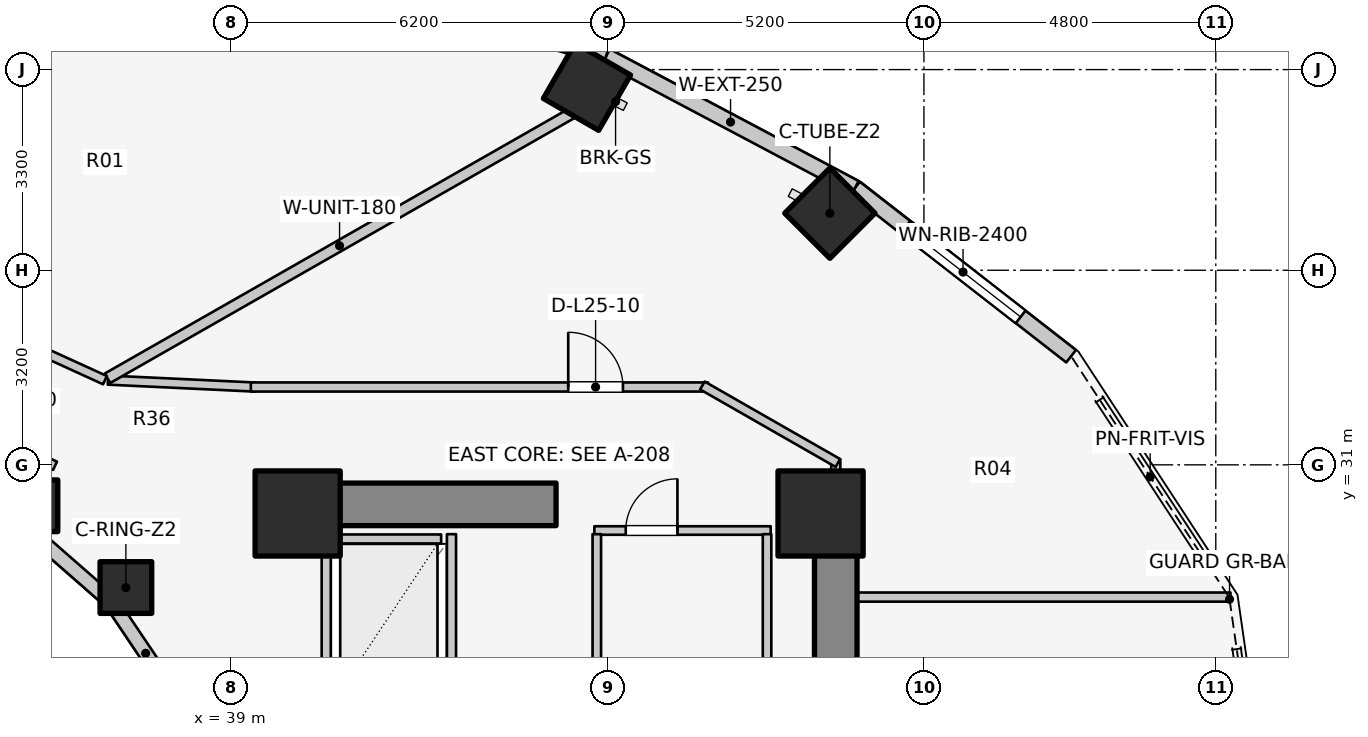
"""IFC4 building model, lengths in metres.
Left out: names, types, materials, properties, quantities, classifications, styles, units other than length and angle.
Written with IfcOpenShell. Run it as: python <this file> out.ifc"""

import sys

from ifc_helpers import new_model, si_unit, direction, frame, frame_2d, origin, origin_2d, place, context, subcontext, project, spatial, rectangle, extrude, element, fill, save


model = new_model("IFC4")
c1 = context("Model", 3, precision=1e-05, world=origin(), true_north=direction((0.0, 1.0)))
c2 = subcontext(c1, "Body", "Model", "MODEL_VIEW")
j1 = project(units=[si_unit("LENGTHUNIT", "METRE"), si_unit("PLANEANGLEUNIT", "RADIAN")], contexts=[c1])
p1 = place(None, origin())
s1 = spatial("IfcSite", under=j1, at=p1, CompositionType="ELEMENT")
p2 = place(p1, origin())
s2 = spatial("IfcBuilding", under=s1, at=p2, CompositionType="ELEMENT")
p3 = place(p2, frame((0.0, 0.0, 85.6)))
s3 = spatial("IfcBuildingStorey", under=s2, at=p3, CompositionType="ELEMENT", Elevation=85.6)
p4 = place(p3, frame((48.95, 17.05, 0.0), z_axis=(0.0, 0.0, 1.0), x_axis=(0.0, 1.0, 0.0)))
e1 = element("IfcWall", 1, at=p4, inside=s3, PredefinedType="SHEAR", context=c2, shape_type="SweptSolid", body=[
    extrude(rectangle(XDim=12.8, YDim=0.7, at=frame_2d((6.4, 0.0))), origin(), (0.0, 0.0, 1.0), 3.1),
])
p5 = place(p3, frame((39.85, 30.35, 0.0), z_axis=(0.0, 0.0, 1.0), x_axis=(1.0, 0.0, 0.0)))
e2 = element("IfcWall", 2, at=p5, inside=s3, PredefinedType="SHEAR", context=c2, shape_type="SweptSolid", body=[
    extrude(rectangle(XDim=4.5, YDim=0.7, at=frame_2d((2.25, 0.0))), origin(), (0.0, 0.0, 1.0), 3.1),
])
for number, where, z_axis, x_axis in (
    (3, (48.7, 30.2, 0.0), (0.0, 0.0, 1.0), (1.0, 0.0, 0.0)),
    (4, (40.1, 30.2, 0.0), (0.0, 0.0, 1.0), (1.0, 0.0, 0.0)),
):
    element("IfcColumn", number, at=place(p3, frame(where, z_axis=z_axis, x_axis=x_axis)), inside=s3, PredefinedType="COLUMN", context=c2, shape_type="SweptSolid", body=[
        extrude(rectangle(XDim=1.4, YDim=1.4, at=origin_2d()), origin(), (0.0, 0.0, 1.0), 3.1),
    ])
p6 = place(p3, frame((37.275, 28.982, 0.0), z_axis=(0.0, 0.0, 1.0), x_axis=(1.0, 0.0, 0.0)))
e5 = element("IfcColumn", 5, at=p6, inside=s3, PredefinedType="COLUMN", context=c2, shape_type="SweptSolid", body=[
    extrude(rectangle(XDim=0.85, YDim=0.85, at=origin_2d()), origin(), (0.0, 0.0, 1.0), 3.1),
])
p7 = place(p3, frame((48.853, 35.138, 0.0), z_axis=(0.0, 0.0, 1.0), x_axis=(0.707106781187, 0.707106781187, 0.0)))
e6 = element("IfcColumn", 6, at=p7, inside=s3, PredefinedType="COLUMN", context=c2, shape_type="SweptSolid", body=[
    extrude(rectangle(XDim=1.05, YDim=1.05, at=origin_2d()), origin(), (0.0, 0.0, 1.0), 3.1),
])
p8 = place(p3, frame((35.73, 30.327, 0.0), z_axis=(0.0, 0.0, 1.0), x_axis=(1.0, 0.0, 0.0)))
e7 = element("IfcColumn", 7, at=p8, inside=s3, PredefinedType="COLUMN", context=c2, shape_type="SweptSolid", body=[
    extrude(rectangle(XDim=0.85, YDim=0.85, at=origin_2d()), origin(), (0.0, 0.0, 1.0), 3.1),
])
p9 = place(p3, frame((44.858, 37.218, 0.0), z_axis=(0.0, 0.0, 1.0), x_axis=(0.5, 0.866025403784, 0.0)))
e8 = element("IfcColumn", 8, at=p9, inside=s3, PredefinedType="COLUMN", context=c2, shape_type="SweptSolid", body=[
    extrude(rectangle(XDim=1.05, YDim=1.05, at=origin_2d()), origin(), (0.0, 0.0, 1.0), 3.1),
])
p10 = place(p3, frame((38.166, 27.06, 0.0), z_axis=(0.0, 0.0, 1.0), x_axis=(-0.558197800898, 0.829707909492, 0.0)))
e9 = element("IfcWall", 9, at=p10, inside=s3, PredefinedType="STANDARD", context=c2, shape_type="SweptSolid", body=[
    extrude(rectangle(XDim=2.027, YDim=0.23, at=frame_2d((1.013, 0.0))), origin(), (0.0, 0.0, 1.0), 2.16),
])
p11 = place(p3, frame((37.035, 28.742, 0.0), z_axis=(0.0, 0.0, 1.0), x_axis=(-0.752576694707, 0.658504607869, 0.0)))
e10 = element("IfcWall", 10, at=p11, inside=s3, PredefinedType="STANDARD", context=c2, shape_type="SweptSolid", body=[
    extrude(rectangle(XDim=1.959, YDim=0.23, at=frame_2d((0.98, 0.0))), origin(), (0.0, 0.0, 1.0), 2.16),
])
p12 = place(p3, frame((52.821, 32.786, 0.0), z_axis=(0.0, 0.0, 1.0), x_axis=(-0.789127449954, 0.614229491094, 0.0)))
e11 = element("IfcWall", 11, at=p12, inside=s3, PredefinedType="STANDARD", context=c2, shape_type="SweptSolid", body=[
    extrude(rectangle(XDim=4.505, YDim=0.26, at=frame_2d((2.252, 0.0))), origin(), (0.0, 0.0, 1.0), 2.85),
])
p13 = place(p12, frame((1.052, 0.0, 0.75)))
e12 = element("IfcOpeningElement", 12, at=p13, cuts=e11, PredefinedType="OPENING", context=c2, shape_type="SweptSolid", body=[
    extrude(rectangle(XDim=2.4, YDim=1.7, at=frame_2d((1.2, 0.85))), frame((0.0, 0.14, 0.0), z_axis=(0.0, -1.0, 0.0), x_axis=(1.0, 0.0, 0.0)), (0.0, 0.0, 1.0), 0.28),
])
p14 = place(p3, frame((49.266, 35.553, 0.0), z_axis=(0.0, 0.0, 1.0), x_axis=(-0.883668636807, 0.4681129568, 0.0)))
e13 = element("IfcWall", 13, at=p14, inside=s3, PredefinedType="STANDARD", context=c2, shape_type="SweptSolid", body=[
    extrude(rectangle(XDim=4.631, YDim=0.26, at=frame_2d((2.316, 0.0))), origin(), (0.0, 0.0, 1.0), 2.85),
])
p15 = place(p3, frame((45.173, 37.721, 0.0), z_axis=(0.0, 0.0, 1.0), x_axis=(-0.962938491413, 0.269721081407, 0.0)))
e14 = element("IfcWall", 14, at=p15, inside=s3, PredefinedType="STANDARD", context=c2, shape_type="SweptSolid", body=[
    extrude(rectangle(XDim=5.563, YDim=0.26, at=frame_2d((2.782, 0.0))), origin(), (0.0, 0.0, 1.0), 2.85),
])
p16 = place(p15, frame((2.031, 0.0, 0.75)))
e15 = element("IfcOpeningElement", 15, at=p16, cuts=e14, PredefinedType="OPENING", context=c2, shape_type="SweptSolid", body=[
    extrude(rectangle(XDim=1.5, YDim=1.6, at=frame_2d((0.75, 0.8))), frame((0.0, 0.14, 0.0), z_axis=(0.0, -1.0, 0.0), x_axis=(1.0, 0.0, 0.0)), (0.0, 0.0, 1.0), 0.28),
])
p17 = place(p3, frame((40.74, 29.78, 0.0), z_axis=(0.0, 0.0, 1.0), x_axis=(1.0, 0.0, 0.0)))
e16 = element("IfcWall", 16, at=p17, inside=s3, PredefinedType="SOLIDWALL", context=c2, shape_type="SweptSolid", body=[
    extrude(rectangle(XDim=1.72, YDim=0.15, at=frame_2d((0.86, 0.0))), origin(), (0.0, 0.0, 1.0), 2.855),
])
for number, where, z_axis, x_axis in (
    (17, (40.57, 27.14, 0.0), (0.0, 0.0, 1.0), (0.0, 1.0, 0.0)),
    (18, (42.63, 27.14, 0.0), (0.0, 0.0, 1.0), (0.0, 1.0, 0.0)),
):
    element("IfcWall", number, at=place(p3, frame(where, z_axis=z_axis, x_axis=x_axis)), inside=s3, PredefinedType="SOLIDWALL", context=c2, shape_type="SweptSolid", body=[
        extrude(rectangle(XDim=2.72, YDim=0.15, at=frame_2d((1.36, 0.0))), origin(), (0.0, 0.0, 1.0), 2.855),
    ])
p18 = place(p3, frame((44.98, 29.92, 0.0), z_axis=(0.0, 0.0, 1.0), x_axis=(1.0, 0.0, 0.0)))
e19 = element("IfcWall", 19, at=p18, inside=s3, PredefinedType="PLUMBINGWALL", context=c2, shape_type="SweptSolid", body=[
    extrude(rectangle(XDim=2.9, YDim=0.14, at=frame_2d((1.45, 0.0))), origin(), (0.0, 0.0, 1.0), 2.855),
])
p19 = place(p18, frame((0.516, 0.0, 0.0)))
e20 = element("IfcOpeningElement", 20, at=p19, cuts=e19, PredefinedType="OPENING", context=c2, shape_type="SweptSolid", body=[
    extrude(rectangle(XDim=0.85, YDim=2.05, at=frame_2d((0.425, 1.025))), frame((0.0, 0.08, 0.0), z_axis=(0.0, -1.0, 0.0), x_axis=(1.0, 0.0, 0.0)), (0.0, 0.0, 1.0), 0.16),
])
for number, where, z_axis, x_axis in (
    (21, (45.02, 25.98, 0.0), (0.0, 0.0, 1.0), (0.0, 1.0, 0.0)),
    (22, (47.82, 25.98, 0.0), (0.0, 0.0, 1.0), (0.0, 1.0, 0.0)),
):
    element("IfcWall", number, at=place(p3, frame(where, z_axis=z_axis, x_axis=x_axis)), inside=s3, PredefinedType="PLUMBINGWALL", context=c2, shape_type="SweptSolid", body=[
        extrude(rectangle(XDim=3.88, YDim=0.14, at=frame_2d((1.94, 0.0))), origin(), (0.0, 0.0, 1.0), 2.855),
    ])
p20 = place(p3, frame((36.11, 30.985, 0.0), z_axis=(0.0, 0.0, 1.0), x_axis=(-0.906943449489, 0.421252393975, 0.0)))
e23 = element("IfcWall", 23, at=p20, inside=s3, PredefinedType="PARTITIONING", context=c2, shape_type="SweptSolid", body=[
    extrude(rectangle(XDim=2.186, YDim=0.15, at=frame_2d((1.093, 0.0))), origin(), (0.0, 0.0, 1.0), 2.272),
])
p21 = place(p3, frame((48.95, 28.825, 0.0), z_axis=(0.0, 0.0, 1.0), x_axis=(1.0, 0.0, 0.0)))
e24 = element("IfcWall", 24, at=p21, inside=s3, PredefinedType="PARTITIONING", context=c2, shape_type="SweptSolid", body=[
    extrude(rectangle(XDim=6.492, YDim=0.15, at=frame_2d((3.246, 0.0))), origin(), (0.0, 0.0, 1.0), 2.855),
])
p22 = place(p3, frame((48.95, 29.8, 0.0), z_axis=(0.0, 0.0, 1.0), x_axis=(0.0, 1.0, 0.0)))
e25 = element("IfcWall", 25, at=p22, inside=s3, PredefinedType="PARTITIONING", context=c2, shape_type="SweptSolid", body=[
    extrude(rectangle(XDim=1.29, YDim=0.15, at=frame_2d((0.645, 0.0))), origin(), (0.0, 0.0, 1.0), 2.142),
])
p23 = place(p3, frame((36.98, 32.394, 0.0), z_axis=(0.0, 0.0, 1.0), x_axis=(0.998877427952, -0.047369651964, 0.0)))
e26 = element("IfcWall", 26, at=p23, inside=s3, PredefinedType="PARTITIONING", context=c2, shape_type="SweptSolid", body=[
    extrude(rectangle(XDim=2.433, YDim=0.15, at=frame_2d((1.216, 0.0))), origin(), (0.0, 0.0, 1.0), 2.272),
])
p24 = place(p3, frame((39.33, 32.28, 0.0), z_axis=(0.0, 0.0, 1.0), x_axis=(1.0, 0.0, 0.0)))
e27 = element("IfcWall", 27, at=p24, inside=s3, PredefinedType="PARTITIONING", context=c2, shape_type="SweptSolid", body=[
    extrude(rectangle(XDim=7.52, YDim=0.15, at=frame_2d((3.76, 0.0))), origin(), (0.0, 0.0, 1.0), 2.272),
])
p25 = place(p24, frame((5.22, 0.0, 0.0)))
e28 = element("IfcOpeningElement", 28, at=p25, cuts=e27, PredefinedType="OPENING", context=c2, shape_type="SweptSolid", body=[
    extrude(rectangle(XDim=0.9, YDim=2.1, at=frame_2d((0.45, 1.05))), frame((0.0, 0.085, 0.0), z_axis=(0.0, -1.0, 0.0), x_axis=(1.0, 0.0, 0.0)), (0.0, 0.0, 1.0), 0.17),
])
p26 = place(p3, frame((46.757, 32.305, 0.0), z_axis=(0.0, 0.0, 1.0), x_axis=(0.867991349648, -0.496579315857, 0.0)))
e29 = element("IfcWall", 29, at=p26, inside=s3, PredefinedType="PARTITIONING", context=c2, shape_type="SweptSolid", body=[
    extrude(rectangle(XDim=2.567, YDim=0.15, at=frame_2d((1.283, 0.0))), origin(), (0.0, 0.0, 1.0), 2.142),
])
p27 = place(p3, frame((36.973, 32.424, 0.0), z_axis=(0.0, 0.0, 1.0), x_axis=(0.868484076301, 0.495717065685, 0.0)))
e30 = element("IfcWall", 30, at=p27, inside=s3, PredefinedType="PARTITIONING", context=c2, shape_type="SweptSolid", body=[
    extrude(rectangle(XDim=8.789, YDim=0.18, at=frame_2d((4.394, 0.0))), origin(), (0.0, 0.0, 1.0), 2.272),
])
p28 = place(p3, frame((36.931, 32.393, 0.0), z_axis=(0.0, 0.0, 1.0), x_axis=(-0.909747571199, 0.415161843982, 0.0)))
e31 = element("IfcWall", 31, at=p28, inside=s3, PredefinedType="PARTITIONING", context=c2, shape_type="SweptSolid", body=[
    extrude(rectangle(XDim=2.625, YDim=0.15, at=frame_2d((1.312, 0.0))), origin(), (0.0, 0.0, 1.0), 2.272),
])
p29 = place(p13, origin())
e32 = element("IfcWindow", 32, at=p29, inside=s3, PartitioningType="SINGLE_PANEL", PredefinedType="WINDOW", context=c2, shape_type="SweptSolid", body=[
    extrude(rectangle(XDim=2.4, YDim=1.7, at=frame_2d((1.2, 0.85))), frame((0.0, 0.03, 0.0), z_axis=(0.0, -1.0, 0.0), x_axis=(1.0, 0.0, 0.0)), (0.0, 0.0, 1.0), 0.06),
])
fill(e12, e32)
p30 = place(p19, origin())
e33 = element("IfcDoor", 33, at=p30, inside=s3, OperationType="SINGLE_SWING_RIGHT", PredefinedType="DOOR", context=c2, shape_type="SweptSolid", body=[
    extrude(rectangle(XDim=0.85, YDim=2.05, at=frame_2d((0.425, 1.025))), frame((0.0, 0.025, 0.0), z_axis=(0.0, -1.0, 0.0), x_axis=(1.0, 0.0, 0.0)), (0.0, 0.0, 1.0), 0.05),
])
fill(e20, e33)
p31 = place(p25, origin())
e34 = element("IfcDoor", 34, at=p31, inside=s3, OperationType="SINGLE_SWING_LEFT", PredefinedType="DOOR", context=c2, shape_type="SweptSolid", body=[
    extrude(rectangle(XDim=0.9, YDim=2.1, at=frame_2d((0.45, 1.05))), frame((0.0, 0.025, 0.0), z_axis=(0.0, -1.0, 0.0), x_axis=(1.0, 0.0, 0.0)), (0.0, 0.0, 1.0), 0.05),
])
fill(e28, e34)
save(model, sys.argv[1])
